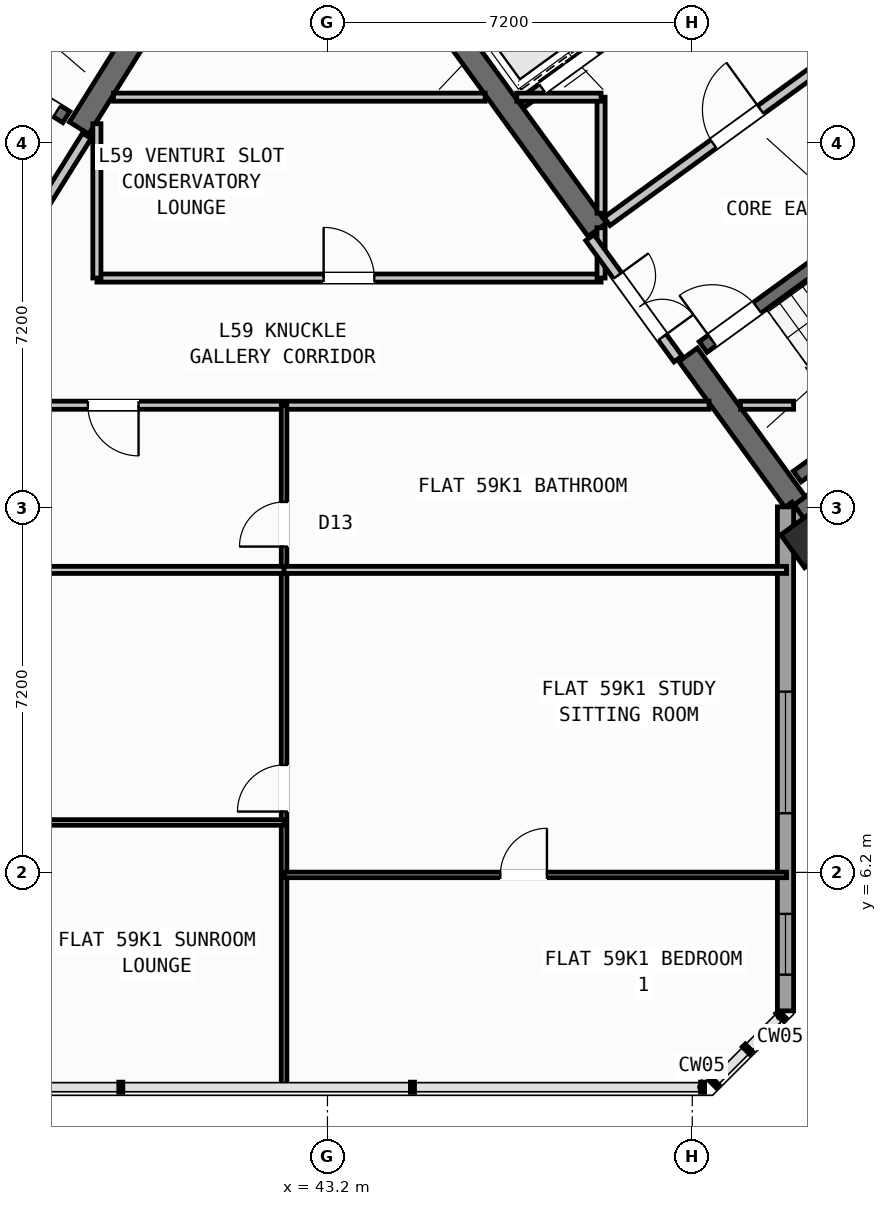
"""IFC4 building model, lengths in metres.
Left out: names, types, materials, properties, quantities, classifications, styles, units other than length and angle.
Written with IfcOpenShell. Run it as: python <this file> out.ifc"""

import sys

from ifc_helpers import new_model, si_unit, direction, frame, frame_2d, origin, origin_2d, place, context, subcontext, project, spatial, rectangle, hollow_rectangle, extrude, source, transform, mapped, element, fill, save


model = new_model("IFC4")
c1 = context("Model", 3, precision=1e-05, world=origin(), true_north=direction((0.0, 1.0)))
c2 = subcontext(c1, "Body", "Model", "MODEL_VIEW")
j1 = project(units=[si_unit("LENGTHUNIT", "METRE"), si_unit("PLANEANGLEUNIT", "RADIAN")], contexts=[c1])
p1 = place(None, origin())
s1 = spatial("IfcSite", under=j1, at=p1, CompositionType="ELEMENT")
p2 = place(p1, origin())
s2 = spatial("IfcBuilding", under=s1, at=p2, CompositionType="ELEMENT")
p3 = place(p2, frame((0.0, 0.0, 233.7)))
s3 = spatial("IfcBuildingStorey", under=s2, at=p3, CompositionType="ELEMENT", Elevation=233.7)
p4 = place(p3, frame((40.221, 23.965, 0.0), z_axis=(0.0, 0.0, 1.0), x_axis=(-0.529902075036, -0.848058836916, 0.0)))
e1 = element("IfcWall", 1, at=p4, inside=s3, PredefinedType="SHEAR", context=c2, shape_type="SweptSolid", body=[
    extrude(rectangle(XDim=3.625, YDim=0.45, at=frame_2d((1.812, 0.0))), origin(), (0.0, 0.0, 1.0), 4.55),
])
p5 = place(p3, frame((52.399, 13.169, 0.0), z_axis=(0.0, 0.0, 1.0), x_axis=(0.809022352778, 0.587777877013, 0.0)))
e2 = element("IfcWall", 2, at=p5, inside=s3, PredefinedType="SHEAR", context=c2, shape_type="SweptSolid", body=[
    extrude(rectangle(XDim=12.24, YDim=0.45, at=frame_2d((6.12, 0.0))), origin(), (0.0, 0.0, 1.0), 4.55),
])
p6 = place(p3, frame((52.449, 13.483, 0.0), z_axis=(0.0, 0.0, 1.0), x_axis=(-0.587819244441, 0.808992296542, 0.0)))
e3 = element("IfcWall", 3, at=p6, inside=s3, PredefinedType="SHEAR", context=c2, shape_type="SweptSolid", body=[
    extrude(rectangle(XDim=3.625, YDim=0.45, at=frame_2d((1.812, 0.0))), origin(), (0.0, 0.0, 1.0), 4.55),
])
p7 = place(p3, frame((48.526, 18.884, 0.0), z_axis=(0.0, 0.0, 1.0), x_axis=(-0.587774812919, 0.809024578921, 0.0)))
e4 = element("IfcWall", 4, at=p7, inside=s3, PredefinedType="SHEAR", context=c2, shape_type="SweptSolid", body=[
    extrude(rectangle(XDim=6.475, YDim=0.45, at=frame_2d((3.238, 0.0))), origin(), (0.0, 0.0, 1.0), 4.55),
])
m1 = source(origin(), c2, "Body", "SweptSolid", [
    extrude(hollow_rectangle(XDim=0.8, YDim=0.8, WallThickness=0.032, at=origin_2d()), origin(), (0.0, 0.0, 1.0), 4.8),
])
p8 = place(p3, frame((52.705, 12.773, 0.0), z_axis=(0.0, 0.0, 1.0), x_axis=(0.809016994375, 0.587785252292, 0.0)))
e5 = element("IfcColumn", 5, at=p8, inside=s3, PredefinedType="COLUMN", context=c2, shape_type="MappedRepresentation", body=[
    mapped(m1, transform((0.0, 0.0, 0.0), scale=1.0)),
])
p9 = place(p3, frame((56.581, 7.439, 0.0), z_axis=(0.0, 0.0, 1.0), x_axis=(-0.587776558368, 0.809023310809, 0.0)))
e6 = element("IfcWall", 6, at=p9, inside=s3, PredefinedType="STANDARD", context=c2, shape_type="SweptSolid", body=[
    extrude(rectangle(XDim=7.385, YDim=0.32, at=frame_2d((3.693, 0.0))), origin(), (0.0, 0.0, 1.0), 4.075),
])
p10 = place(p3, frame((52.24, 13.414, 0.0), z_axis=(0.0, 0.0, 1.0), x_axis=(0.0, -1.0, 0.0)))
e7 = element("IfcWall", 7, at=p10, inside=s3, PredefinedType="STANDARD", context=c2, shape_type="SweptSolid", body=[
    extrude(rectangle(XDim=9.948, YDim=0.32, at=frame_2d((4.974, 0.0))), origin(), (0.0, 0.0, 1.0), 4.55),
])
p11 = place(p10, frame((3.647, 0.0, 0.75)))
e8 = element("IfcOpeningElement", 8, at=p11, cuts=e7, PredefinedType="OPENING", context=c2, shape_type="SweptSolid", body=[
    extrude(rectangle(XDim=2.4, YDim=1.6, at=frame_2d((1.2, 0.8))), frame((0.0, 0.17, 0.0), z_axis=(0.0, -1.0, 0.0), x_axis=(1.0, 0.0, 0.0)), (0.0, 0.0, 1.0), 0.34),
])
p12 = place(p10, frame((8.033, 0.0, 0.95)))
e9 = element("IfcOpeningElement", 9, at=p12, cuts=e7, PredefinedType="OPENING", context=c2, shape_type="SweptSolid", body=[
    extrude(rectangle(XDim=1.2, YDim=1.4, at=frame_2d((0.6, 0.7))), frame((0.0, 0.17, 0.0), z_axis=(0.0, -1.0, 0.0), x_axis=(1.0, 0.0, 0.0)), (0.0, 0.0, 1.0), 0.34),
])
p13 = place(p3, frame((38.046, 21.108, 0.0), z_axis=(0.0, 0.0, 1.0), x_axis=(-0.848054434086, 0.529909121291, 0.0)))
e10 = element("IfcWall", 10, at=p13, inside=s3, PredefinedType="SHEAR", context=c2, shape_type="SweptSolid", body=[
    extrude(rectangle(XDim=7.33, YDim=0.26, at=frame_2d((3.665, 0.0))), origin(), (0.0, 0.0, 1.0), 4.55),
])
p14 = place(p13, frame((0.22, 0.0, 0.0)))
e11 = element("IfcOpeningElement", 11, at=p14, cuts=e10, PredefinedType="OPENING", context=c2, shape_type="SweptSolid", body=[
    extrude(rectangle(XDim=1.1, YDim=2.1, at=frame_2d((0.55, 1.05))), frame((0.0, 0.14, 0.0), z_axis=(0.0, -1.0, 0.0), x_axis=(1.0, 0.0, 0.0)), (0.0, 0.0, 1.0), 0.28),
])
p15 = place(p3, frame((52.472, 14.013, 0.0), z_axis=(0.0, 0.0, 1.0), x_axis=(0.809028366311, 0.587769599847, 0.0)))
e12 = element("IfcWall", 12, at=p15, inside=s3, PredefinedType="SHEAR", context=c2, shape_type="SweptSolid", body=[
    extrude(rectangle(XDim=7.33, YDim=0.26, at=frame_2d((3.665, 0.0))), origin(), (0.0, 0.0, 1.0), 4.55),
])
p16 = place(p3, frame((50.615, 16.57, 0.0), z_axis=(0.0, 0.0, 1.0), x_axis=(0.809028366311, 0.587769599847, 0.0)))
e13 = element("IfcWall", 13, at=p16, inside=s3, PredefinedType="SHEAR", context=c2, shape_type="SweptSolid", body=[
    extrude(rectangle(XDim=7.33, YDim=0.26, at=frame_2d((3.665, 0.0))), origin(), (0.0, 0.0, 1.0), 4.55),
])
p17 = place(p16, frame((0.22, 0.0, 0.0)))
e14 = element("IfcOpeningElement", 14, at=p17, cuts=e13, PredefinedType="OPENING", context=c2, shape_type="SweptSolid", body=[
    extrude(rectangle(XDim=1.1, YDim=2.1, at=frame_2d((0.55, 1.05))), frame((0.0, 0.14, 0.0), z_axis=(0.0, -1.0, 0.0), x_axis=(1.0, 0.0, 0.0)), (0.0, 0.0, 1.0), 0.28),
])
p18 = place(p3, frame((47.025, 21.378, 0.0), z_axis=(0.0, 0.0, 1.0), x_axis=(0.809052869724, 0.587735870941, 0.0)))
e15 = element("IfcWall", 15, at=p18, inside=s3, PredefinedType="STANDARD", context=c2, shape_type="SweptSolid", body=[
    extrude(rectangle(XDim=3.498, YDim=0.2, at=frame_2d((1.749, 0.0))), origin(), (0.0, 0.0, 1.0), 4.54),
])
p19 = place(p18, frame((0.508, 0.0, 0.0)))
e16 = element("IfcOpeningElement", 16, at=p19, cuts=e15, PredefinedType="OPENING", context=c2, shape_type="SweptSolid", body=[
    extrude(rectangle(XDim=1.3, YDim=2.2, at=frame_2d((0.65, 1.1))), frame((0.0, 0.11, 0.0), z_axis=(0.0, -1.0, 0.0), x_axis=(1.0, 0.0, 0.0)), (0.0, 0.0, 1.0), 0.22),
])
p20 = place(p3, frame((48.718, 19.048, 0.0), z_axis=(0.0, 0.0, 1.0), x_axis=(0.809017261719, 0.587784884325, 0.0)))
e17 = element("IfcWall", 17, at=p20, inside=s3, PredefinedType="STANDARD", context=c2, shape_type="SweptSolid", body=[
    extrude(rectangle(XDim=5.818, YDim=0.2, at=frame_2d((2.909, 0.0))), origin(), (0.0, 0.0, 1.0), 4.54),
])
p21 = place(p20, frame((2.598, 0.0, 0.0)))
e18 = element("IfcOpeningElement", 18, at=p21, cuts=e17, PredefinedType="OPENING", context=c2, shape_type="SweptSolid", body=[
    extrude(rectangle(XDim=1.15, YDim=2.1, at=frame_2d((0.575, 1.05))), frame((0.0, 0.11, 0.0), z_axis=(0.0, -1.0, 0.0), x_axis=(1.0, 0.0, 0.0)), (0.0, 0.0, 1.0), 0.22),
])
p22 = place(p3, frame((38.451, 20.737, 0.0), z_axis=(0.0, 0.0, 1.0), x_axis=(-0.529924799939, -0.848044637038, 0.0)))
e19 = element("IfcWall", 19, at=p22, inside=s3, PredefinedType="STANDARD", context=c2, shape_type="SweptSolid", body=[
    extrude(rectangle(XDim=2.96, YDim=0.2, at=frame_2d((1.48, 0.0))), origin(), (0.0, 0.0, 1.0), 4.54),
])
p23 = place(p22, frame((1.46, 0.0, 0.0)))
e20 = element("IfcOpeningElement", 20, at=p23, cuts=e19, PredefinedType="OPENING", context=c2, shape_type="SweptSolid", body=[
    extrude(rectangle(XDim=0.86, YDim=2.05, at=frame_2d((0.43, 1.025))), frame((0.0, 0.11, 0.0), z_axis=(0.0, -1.0, 0.0), x_axis=(1.0, 0.0, 0.0)), (0.0, 0.0, 1.0), 0.22),
])
p24 = place(p3, frame((35.178, 15.42, 0.0), z_axis=(0.0, 0.0, 1.0), x_axis=(1.0, 0.0, 0.0)))
e21 = element("IfcWall", 21, at=p24, inside=s3, PredefinedType="PARTITIONING", context=c2, shape_type="SweptSolid", body=[
    extrude(rectangle(XDim=15.552, YDim=0.16, at=frame_2d((7.776, 0.0))), origin(), (0.0, 0.0, 1.0), 4.54),
])
p25 = place(p24, frame((3.294, 0.0, 0.0)))
e22 = element("IfcOpeningElement", 22, at=p25, cuts=e21, PredefinedType="OPENING", context=c2, shape_type="SweptSolid", body=[
    extrude(rectangle(XDim=1.0, YDim=2.1, at=frame_2d((0.5, 1.05))), frame((0.0, 0.09, 0.0), z_axis=(0.0, -1.0, 0.0), x_axis=(1.0, 0.0, 0.0)), (0.0, 0.0, 1.0), 0.18),
])
p26 = place(p3, frame((51.354, 15.42, 0.0), z_axis=(0.0, 0.0, 1.0), x_axis=(1.0, 0.0, 0.0)))
e23 = element("IfcWall", 23, at=p26, inside=s3, PredefinedType="PARTITIONING", context=c2, shape_type="SweptSolid", body=[
    extrude(rectangle(XDim=1.046, YDim=0.16, at=frame_2d((0.523, 0.0))), origin(), (0.0, 0.0, 1.0), 4.54),
])
p27 = place(p3, frame((38.65, 17.93, 0.0), z_axis=(0.0, 0.0, 1.0), x_axis=(1.0, 0.0, 0.0)))
e24 = element("IfcWall", 24, at=p27, inside=s3, PredefinedType="PARTITIONING", context=c2, shape_type="SweptSolid", body=[
    extrude(rectangle(XDim=9.95, YDim=0.16, at=frame_2d((4.975, 0.0))), origin(), (0.0, 0.0, 1.0), 4.54),
])
p28 = place(p27, frame((4.475, 0.0, 0.0)))
e25 = element("IfcOpeningElement", 25, at=p28, cuts=e24, PredefinedType="OPENING", context=c2, shape_type="SweptSolid", body=[
    extrude(rectangle(XDim=1.0, YDim=2.1, at=frame_2d((0.5, 1.05))), frame((0.0, 0.09, 0.0), z_axis=(0.0, -1.0, 0.0), x_axis=(1.0, 0.0, 0.0)), (0.0, 0.0, 1.0), 0.18),
])
p29 = place(p3, frame((38.65, 17.93, 0.0), z_axis=(0.0, 0.0, 1.0), x_axis=(0.0, 1.0, 0.0)))
e26 = element("IfcWall", 26, at=p29, inside=s3, PredefinedType="PARTITIONING", context=c2, shape_type="SweptSolid", body=[
    extrude(rectangle(XDim=3.046, YDim=0.16, at=frame_2d((1.523, 0.0))), origin(), (0.0, 0.0, 1.0), 4.54),
])
p30 = place(p3, frame((48.6, 17.93, 0.0), z_axis=(0.0, 0.0, 1.0), x_axis=(0.0, 1.0, 0.0)))
e27 = element("IfcWall", 27, at=p30, inside=s3, PredefinedType="PARTITIONING", context=c2, shape_type="SweptSolid", body=[
    extrude(rectangle(XDim=0.993, YDim=0.16, at=frame_2d((0.496, 0.0))), origin(), (0.0, 0.0, 1.0), 4.54),
])
p31 = place(p3, frame((48.6, 19.21, 0.0), z_axis=(0.0, 0.0, 1.0), x_axis=(0.0, 1.0, 0.0)))
e28 = element("IfcWall", 28, at=p31, inside=s3, PredefinedType="PARTITIONING", context=c2, shape_type="SweptSolid", body=[
    extrude(rectangle(XDim=2.29, YDim=0.16, at=frame_2d((1.145, 0.0))), origin(), (0.0, 0.0, 1.0), 4.54),
])
p32 = place(p3, frame((38.978, 21.5, 0.0), z_axis=(0.0, 0.0, 1.0), x_axis=(1.0, 0.0, 0.0)))
e29 = element("IfcWall", 29, at=p32, inside=s3, PredefinedType="PARTITIONING", context=c2, shape_type="SweptSolid", body=[
    extrude(rectangle(XDim=7.336, YDim=0.16, at=frame_2d((3.668, 0.0))), origin(), (0.0, 0.0, 1.0), 4.54),
])
p33 = place(p3, frame((46.936, 21.5, 0.0), z_axis=(0.0, 0.0, 1.0), x_axis=(1.0, 0.0, 0.0)))
e30 = element("IfcWall", 30, at=p33, inside=s3, PredefinedType="PARTITIONING", context=c2, shape_type="SweptSolid", body=[
    extrude(rectangle(XDim=1.664, YDim=0.16, at=frame_2d((0.832, 0.0))), origin(), (0.0, 0.0, 1.0), 4.54),
])
p34 = place(p3, frame((50.119, 16.333, 0.0), z_axis=(0.0, 0.0, 1.0), x_axis=(-0.587749856981, 0.809042709391, 0.0)))
e31 = element("IfcWall", 31, at=p34, inside=s3, PredefinedType="STANDARD", context=c2, shape_type="SweptSolid", body=[
    extrude(rectangle(XDim=2.96, YDim=0.2, at=frame_2d((1.48, 0.0))), origin(), (0.0, 0.0, 1.0), 4.54),
])
p35 = place(p34, frame((0.53, 0.0, 0.0)))
e32 = element("IfcOpeningElement", 32, at=p35, cuts=e31, PredefinedType="OPENING", context=c2, shape_type="SweptSolid", body=[
    extrude(rectangle(XDim=1.5, YDim=2.15, at=frame_2d((0.75, 1.075))), frame((0.0, 0.11, 0.0), z_axis=(0.0, -1.0, 0.0), x_axis=(1.0, 0.0, 0.0)), (0.0, 0.0, 1.0), 0.22),
])
p36 = place(p3, frame((42.344, 1.96, 0.0), z_axis=(0.0, 0.0, 1.0), x_axis=(0.0, 1.0, 0.0)))
e33 = element("IfcWall", 33, at=p36, inside=s3, PredefinedType="PARTITIONING", context=c2, shape_type="SweptSolid", body=[
    extrude(rectangle(XDim=13.46, YDim=0.11, at=frame_2d((6.73, 0.0))), origin(), (0.0, 0.0, 1.0), 4.54),
])
p37 = place(p36, frame((5.44, 0.0, 0.0)))
e34 = element("IfcOpeningElement", 34, at=p37, cuts=e33, PredefinedType="OPENING", context=c2, shape_type="SweptSolid", body=[
    extrude(rectangle(XDim=0.92, YDim=2.08, at=frame_2d((0.46, 1.04))), frame((0.0, 0.065, 0.0), z_axis=(0.0, -1.0, 0.0), x_axis=(1.0, 0.0, 0.0)), (0.0, 0.0, 1.0), 0.13),
])
p38 = place(p36, frame((10.67, 0.0, 0.0)))
e35 = element("IfcOpeningElement", 35, at=p38, cuts=e33, PredefinedType="OPENING", context=c2, shape_type="SweptSolid", body=[
    extrude(rectangle(XDim=0.88, YDim=2.08, at=frame_2d((0.44, 1.04))), frame((0.0, 0.065, 0.0), z_axis=(0.0, -1.0, 0.0), x_axis=(1.0, 0.0, 0.0)), (0.0, 0.0, 1.0), 0.13),
])
p39 = place(p3, frame((33.584, 12.17, 0.0), z_axis=(0.0, 0.0, 1.0), x_axis=(1.0, 0.0, 0.0)))
e36 = element("IfcWall", 36, at=p39, inside=s3, PredefinedType="PLUMBINGWALL", context=c2, shape_type="SweptSolid", body=[
    extrude(rectangle(XDim=8.76, YDim=0.14, at=frame_2d((4.38, 0.0))), origin(), (0.0, 0.0, 1.0), 3.725),
])
p40 = place(p39, frame((3.178, 0.0, 0.0)))
e37 = element("IfcOpeningElement", 37, at=p40, cuts=e36, PredefinedType="OPENING", context=c2, shape_type="SweptSolid", body=[
    extrude(rectangle(XDim=0.92, YDim=2.08, at=frame_2d((0.46, 1.04))), frame((0.0, 0.08, 0.0), z_axis=(0.0, -1.0, 0.0), x_axis=(1.0, 0.0, 0.0)), (0.0, 0.0, 1.0), 0.16),
])
p41 = place(p3, frame((42.344, 12.17, 0.0), z_axis=(0.0, 0.0, 1.0), x_axis=(1.0, 0.0, 0.0)))
e38 = element("IfcWall", 38, at=p41, inside=s3, PredefinedType="PLUMBINGWALL", context=c2, shape_type="SweptSolid", body=[
    extrude(rectangle(XDim=9.916, YDim=0.14, at=frame_2d((4.958, 0.0))), origin(), (0.0, 0.0, 1.0), 3.725),
])
p42 = place(p3, frame((31.74, 7.185, 0.0), z_axis=(0.0, 0.0, 1.0), x_axis=(1.0, 0.0, 0.0)))
e39 = element("IfcWall", 39, at=p42, inside=s3, PredefinedType="PARTITIONING", context=c2, shape_type="SweptSolid", body=[
    extrude(rectangle(XDim=10.604, YDim=0.11, at=frame_2d((5.302, 0.0))), origin(), (0.0, 0.0, 1.0), 4.54),
])
p43 = place(p42, frame((5.022, 0.0, 0.0)))
e40 = element("IfcOpeningElement", 40, at=p43, cuts=e39, PredefinedType="OPENING", context=c2, shape_type="SweptSolid", body=[
    extrude(rectangle(XDim=0.92, YDim=2.08, at=frame_2d((0.46, 1.04))), frame((0.0, 0.065, 0.0), z_axis=(0.0, -1.0, 0.0), x_axis=(1.0, 0.0, 0.0)), (0.0, 0.0, 1.0), 0.13),
])
p44 = place(p3, frame((42.344, 6.15, 0.0), z_axis=(0.0, 0.0, 1.0), x_axis=(1.0, 0.0, 0.0)))
e41 = element("IfcWall", 41, at=p44, inside=s3, PredefinedType="PARTITIONING", context=c2, shape_type="SweptSolid", body=[
    extrude(rectangle(XDim=9.916, YDim=0.11, at=frame_2d((4.958, 0.0))), origin(), (0.0, 0.0, 1.0), 4.54),
])
p45 = place(p44, frame((4.268, 0.0, 0.0)))
e42 = element("IfcOpeningElement", 42, at=p45, cuts=e41, PredefinedType="OPENING", context=c2, shape_type="SweptSolid", body=[
    extrude(rectangle(XDim=0.92, YDim=2.08, at=frame_2d((0.46, 1.04))), frame((0.0, 0.065, 0.0), z_axis=(0.0, -1.0, 0.0), x_axis=(1.0, 0.0, 0.0)), (0.0, 0.0, 1.0), 0.13),
])
m2 = source(origin(), c2, "Body", "SweptSolid", [
    extrude(rectangle(XDim=2.4, YDim=1.6, at=frame_2d((1.2, 0.8))), frame((0.0, 0.03, 0.0), z_axis=(0.0, -1.0, 0.0), x_axis=(1.0, 0.0, 0.0)), (0.0, 0.0, 1.0), 0.06),
])
p46 = place(p11, origin())
e43 = element("IfcWindow", 43, at=p46, inside=s3, PartitioningType="SINGLE_PANEL", PredefinedType="WINDOW", context=c2, shape_type="MappedRepresentation", body=[
    mapped(m2, transform((0.0, 0.0, 0.0), scale=1.0)),
])
fill(e8, e43)
m3 = source(origin(), c2, "Body", "SweptSolid", [
    extrude(rectangle(XDim=1.2, YDim=1.4, at=frame_2d((0.6, 0.7))), frame((0.0, 0.03, 0.0), z_axis=(0.0, -1.0, 0.0), x_axis=(1.0, 0.0, 0.0)), (0.0, 0.0, 1.0), 0.06),
])
p47 = place(p12, origin())
e44 = element("IfcWindow", 44, at=p47, inside=s3, PartitioningType="SINGLE_PANEL", PredefinedType="WINDOW", context=c2, shape_type="MappedRepresentation", body=[
    mapped(m3, transform((0.0, 0.0, 0.0), scale=1.0)),
])
fill(e9, e44)
m4 = source(origin(), c2, "Body", "SweptSolid", [
    extrude(rectangle(XDim=1.1, YDim=2.1, at=frame_2d((0.55, 1.05))), frame((0.0, 0.025, 0.0), z_axis=(0.0, -1.0, 0.0), x_axis=(1.0, 0.0, 0.0)), (0.0, 0.0, 1.0), 0.05),
])
p48 = place(p14, origin())
e45 = element("IfcDoor", 45, at=p48, inside=s3, OperationType="SINGLE_SWING_RIGHT", PredefinedType="DOOR", context=c2, shape_type="MappedRepresentation", body=[
    mapped(m4, transform((0.0, 0.0, 0.0), scale=1.0)),
])
fill(e11, e45)
p49 = place(p17, origin())
e46 = element("IfcDoor", 46, at=p49, inside=s3, OperationType="SINGLE_SWING_LEFT", PredefinedType="DOOR", context=c2, shape_type="MappedRepresentation", body=[
    mapped(m4, transform((0.0, 0.0, 0.0), scale=1.0)),
])
fill(e14, e46)
m5 = source(origin(), c2, "Body", "SweptSolid", [
    extrude(rectangle(XDim=1.15, YDim=2.1, at=frame_2d((0.575, 1.05))), frame((0.0, 0.025, 0.0), z_axis=(0.0, -1.0, 0.0), x_axis=(1.0, 0.0, 0.0)), (0.0, 0.0, 1.0), 0.05),
])
p50 = place(p21, origin())
e47 = element("IfcDoor", 47, at=p50, inside=s3, OperationType="SINGLE_SWING_RIGHT", PredefinedType="DOOR", context=c2, shape_type="MappedRepresentation", body=[
    mapped(m5, transform((0.0, 0.0, 0.0), scale=1.0)),
])
fill(e18, e47)
m6 = source(origin(), c2, "Body", "SweptSolid", [
    extrude(rectangle(XDim=1.3, YDim=2.2, at=frame_2d((0.65, 1.1))), frame((0.0, 0.025, 0.0), z_axis=(0.0, -1.0, 0.0), x_axis=(1.0, 0.0, 0.0)), (0.0, 0.0, 1.0), 0.05),
])
p51 = place(p19, origin())
e48 = element("IfcDoor", 48, at=p51, inside=s3, OperationType="DOUBLE_DOOR_SLIDING", PredefinedType="DOOR", context=c2, shape_type="MappedRepresentation", body=[
    mapped(m6, transform((0.0, 0.0, 0.0), scale=1.0)),
])
fill(e16, e48)
m7 = source(origin(), c2, "Body", "SweptSolid", [
    extrude(rectangle(XDim=1.0, YDim=2.1, at=frame_2d((0.5, 1.05))), frame((0.0, 0.025, 0.0), z_axis=(0.0, -1.0, 0.0), x_axis=(1.0, 0.0, 0.0)), (0.0, 0.0, 1.0), 0.05),
])
p52 = place(p28, origin())
e49 = element("IfcDoor", 49, at=p52, inside=s3, OperationType="SINGLE_SWING_LEFT", PredefinedType="DOOR", context=c2, shape_type="MappedRepresentation", body=[
    mapped(m7, transform((0.0, 0.0, 0.0), scale=1.0)),
])
fill(e25, e49)
m8 = source(origin(), c2, "Body", "SweptSolid", [
    extrude(rectangle(XDim=1.5, YDim=2.15, at=frame_2d((0.75, 1.075))), frame((0.0, 0.025, 0.0), z_axis=(0.0, -1.0, 0.0), x_axis=(1.0, 0.0, 0.0)), (0.0, 0.0, 1.0), 0.05),
])
p53 = place(p35, frame((1.5, 0.0, 0.0), z_axis=(0.0, 0.0, 1.0), x_axis=(-1.0, 0.0, 0.0)))
e50 = element("IfcDoor", 50, at=p53, inside=s3, OperationType="DOUBLE_DOOR_SINGLE_SWING", PredefinedType="DOOR", context=c2, shape_type="MappedRepresentation", body=[
    mapped(m8, transform((0.0, 0.0, 0.0), scale=1.0)),
])
fill(e32, e50)
m9 = source(origin(), c2, "Body", "SweptSolid", [
    extrude(rectangle(XDim=0.92, YDim=2.08, at=frame_2d((0.46, 1.04))), frame((0.0, 0.025, 0.0), z_axis=(0.0, -1.0, 0.0), x_axis=(1.0, 0.0, 0.0)), (0.0, 0.0, 1.0), 0.05),
])
p54 = place(p37, origin())
e51 = element("IfcDoor", 51, at=p54, inside=s3, OperationType="SINGLE_SWING_LEFT", PredefinedType="DOOR", context=c2, shape_type="MappedRepresentation", body=[
    mapped(m9, transform((0.0, 0.0, 0.0), scale=1.0)),
])
fill(e34, e51)
p55 = place(p45, origin())
e52 = element("IfcDoor", 52, at=p55, inside=s3, OperationType="SINGLE_SWING_RIGHT", PredefinedType="DOOR", context=c2, shape_type="MappedRepresentation", body=[
    mapped(m9, transform((0.0, 0.0, 0.0), scale=1.0)),
])
fill(e42, e52)
p56 = place(p25, frame((1.0, 0.0, 0.0), z_axis=(0.0, 0.0, 1.0), x_axis=(-1.0, 0.0, 0.0)))
e53 = element("IfcDoor", 53, at=p56, inside=s3, OperationType="SINGLE_SWING_LEFT", PredefinedType="DOOR", context=c2, shape_type="MappedRepresentation", body=[
    mapped(m7, transform((0.0, 0.0, 0.0), scale=1.0)),
])
fill(e22, e53)
m10 = source(origin(), c2, "Body", "SweptSolid", [
    extrude(rectangle(XDim=0.88, YDim=2.08, at=frame_2d((0.44, 1.04))), frame((0.0, 0.025, 0.0), z_axis=(0.0, -1.0, 0.0), x_axis=(1.0, 0.0, 0.0)), (0.0, 0.0, 1.0), 0.05),
])
p57 = place(p38, origin())
e54 = element("IfcDoor", 54, at=p57, inside=s3, OperationType="SINGLE_SWING_LEFT", PredefinedType="DOOR", context=c2, shape_type="MappedRepresentation", body=[
    mapped(m10, transform((0.0, 0.0, 0.0), scale=1.0)),
])
fill(e35, e54)
save(model, sys.argv[1])
